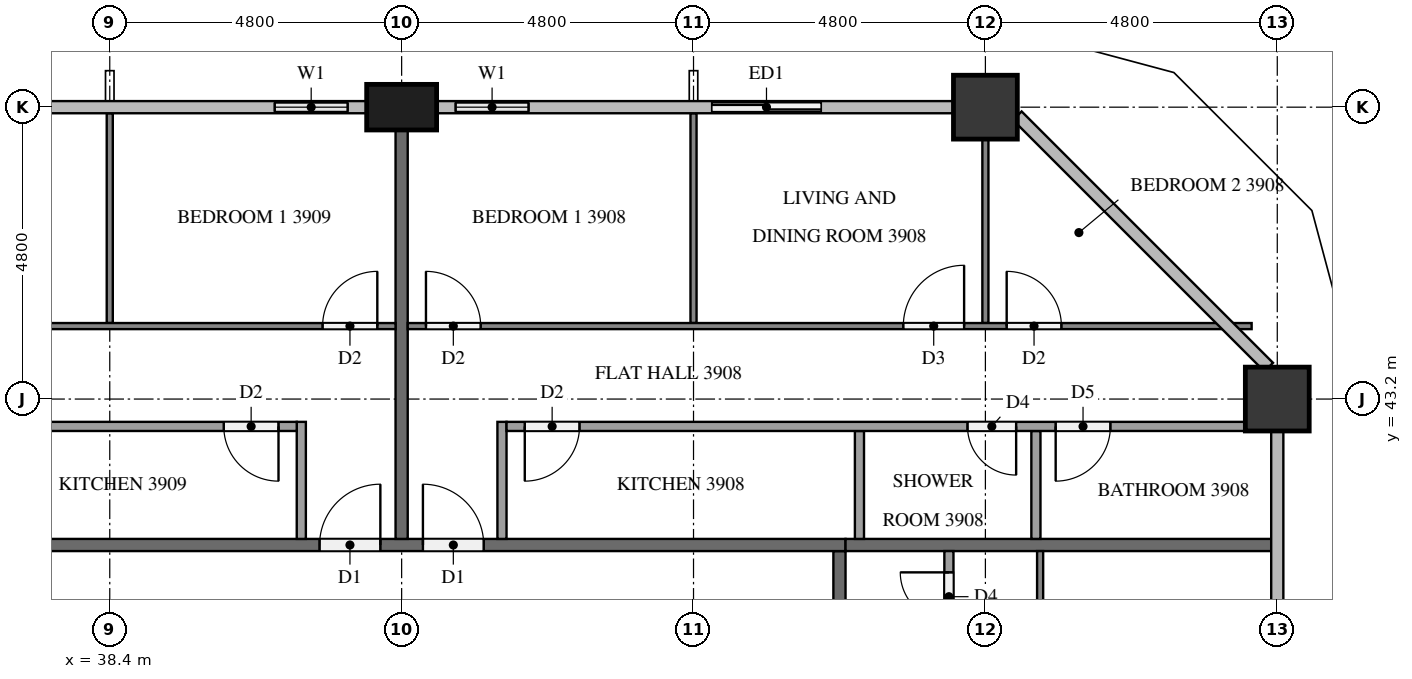
"""IFC4 building model, lengths in metres.
Left out: names, types, materials, properties, quantities, classifications, styles, units other than length and angle.
Written with IfcOpenShell. Run it as: python <this file> out.ifc"""

import sys

from ifc_helpers import new_model, si_unit, direction, frame, frame_2d, origin, origin_2d, place, context, subcontext, project, spatial, rectangle, extrude, element, fill, save


model = new_model("IFC4")
c1 = context("Model", 3, precision=1e-05, world=origin(), true_north=direction((0.0, 1.0)))
c2 = subcontext(c1, "Body", "Model", "MODEL_VIEW")
j1 = project(units=[si_unit("LENGTHUNIT", "METRE"), si_unit("PLANEANGLEUNIT", "RADIAN")], contexts=[c1])
p1 = place(None, origin())
s1 = spatial("IfcSite", under=j1, at=p1, CompositionType="ELEMENT")
p2 = place(p1, origin())
s2 = spatial("IfcBuilding", under=s1, at=p2, CompositionType="ELEMENT")
p3 = place(p2, frame((0.0, 0.0, 152.5)))
s3 = spatial("IfcBuildingStorey", under=s2, at=p3, CompositionType="ELEMENT", Elevation=152.5)
for number, where, z_axis, x_axis in (
    (1, (57.6, 43.2, 0.0), (0.0, 0.0, 1.0), (1.0, 0.0, 0.0)),
    (2, (52.8, 48.0, 0.0), (0.0, 0.0, 1.0), (1.0, 0.0, 0.0)),
):
    element("IfcColumn", number, at=place(p3, frame(where, z_axis=z_axis, x_axis=x_axis)), inside=s3, PredefinedType="COLUMN", context=c2, shape_type="SweptSolid", body=[
        extrude(rectangle(XDim=1.05, YDim=1.05, at=origin_2d()), origin(), (0.0, 0.0, 1.0), 3.2),
    ])
p4 = place(p3, frame((43.2, 48.0, 0.0), z_axis=(0.0, 0.0, 1.0), x_axis=(1.0, 0.0, 0.0)))
e3 = element("IfcColumn", 3, at=p4, inside=s3, PredefinedType="COLUMN", context=c2, shape_type="SweptSolid", body=[
    extrude(rectangle(XDim=1.15, YDim=0.75, at=origin_2d()), origin(), (0.0, 0.0, 1.0), 3.2),
])
p5 = place(p3, frame((50.4, 48.0, 0.0), z_axis=(0.0, 0.0, 1.0), x_axis=(-1.0, 0.0, 0.0)))
e4 = element("IfcWall", 4, at=p5, inside=s3, PredefinedType="SOLIDWALL", context=c2, shape_type="SweptSolid", body=[
    extrude(rectangle(XDim=2.4, YDim=0.15, at=frame_2d((1.2, 0.0))), origin(), (0.0, 0.0, 1.0), 3.2),
])
p6 = place(p5, frame((0.3, 0.0, 0.0)))
e5 = element("IfcOpeningElement", 5, at=p6, cuts=e4, PredefinedType="OPENING", context=c2, shape_type="SweptSolid", body=[
    extrude(rectangle(XDim=1.8, YDim=2.4, at=frame_2d((0.9, 1.2))), frame((0.0, 0.085, 0.0), z_axis=(0.0, -1.0, 0.0), x_axis=(1.0, 0.0, 0.0)), (0.0, 0.0, 1.0), 0.17),
])
p7 = place(p3, frame((45.6, 48.0, 0.0), z_axis=(0.0, 0.0, 1.0), x_axis=(-1.0, 0.0, 0.0)))
e6 = element("IfcWall", 6, at=p7, inside=s3, PredefinedType="SOLIDWALL", context=c2, shape_type="SweptSolid", body=[
    extrude(rectangle(XDim=1.825, YDim=0.15, at=frame_2d((0.913, 0.0))), origin(), (0.0, 0.0, 1.0), 3.2),
])
p8 = place(p7, frame((0.312, 0.0, 0.9)))
e7 = element("IfcOpeningElement", 7, at=p8, cuts=e6, PredefinedType="OPENING", context=c2, shape_type="SweptSolid", body=[
    extrude(rectangle(XDim=1.2, YDim=1.4, at=frame_2d((0.6, 0.7))), frame((0.0, 0.085, 0.0), z_axis=(0.0, -1.0, 0.0), x_axis=(1.0, 0.0, 0.0)), (0.0, 0.0, 1.0), 0.17),
])
p9 = place(p3, frame((42.625, 48.0, 0.0), z_axis=(0.0, 0.0, 1.0), x_axis=(-1.0, 0.0, 0.0)))
e8 = element("IfcWall", 8, at=p9, inside=s3, PredefinedType="SOLIDWALL", context=c2, shape_type="SweptSolid", body=[
    extrude(rectangle(XDim=1.825, YDim=0.15, at=frame_2d((0.913, 0.0))), origin(), (0.0, 0.0, 1.0), 3.2),
])
p10 = place(p9, frame((0.312, 0.0, 0.9)))
e9 = element("IfcOpeningElement", 9, at=p10, cuts=e8, PredefinedType="OPENING", context=c2, shape_type="SweptSolid", body=[
    extrude(rectangle(XDim=1.2, YDim=1.4, at=frame_2d((0.6, 0.7))), frame((0.0, 0.085, 0.0), z_axis=(0.0, -1.0, 0.0), x_axis=(1.0, 0.0, 0.0)), (0.0, 0.0, 1.0), 0.17),
])
p11 = place(p3, frame((50.4, 40.7, 0.0), z_axis=(0.0, 0.0, 1.0), x_axis=(0.0, -1.0, 0.0)))
e10 = element("IfcWall", 10, at=p11, inside=s3, PredefinedType="PARTITIONING", context=c2, shape_type="SweptSolid", body=[
    extrude(rectangle(XDim=28.6, YDim=0.2, at=frame_2d((14.3, 0.0))), origin(), (0.0, 0.0, 1.0), 3.2),
])
p12 = place(p11, frame((17.05, 0.0, 0.0)))
e11 = element("IfcOpeningElement", 11, at=p12, cuts=e10, PredefinedType="OPENING", context=c2, shape_type="SweptSolid", body=[
    extrude(rectangle(XDim=1.0, YDim=2.1, at=frame_2d((0.5, 1.05))), frame((0.0, 0.11, 0.0), z_axis=(0.0, -1.0, 0.0), x_axis=(1.0, 0.0, 0.0)), (0.0, 0.0, 1.0), 0.22),
])
p13 = place(p11, frame((15.35, 0.0, 0.0)))
e12 = element("IfcOpeningElement", 12, at=p13, cuts=e10, PredefinedType="OPENING", context=c2, shape_type="SweptSolid", body=[
    extrude(rectangle(XDim=1.0, YDim=2.1, at=frame_2d((0.5, 1.05))), frame((0.0, 0.11, 0.0), z_axis=(0.0, -1.0, 0.0), x_axis=(1.0, 0.0, 0.0)), (0.0, 0.0, 1.0), 0.22),
])
p14 = place(p11, frame((5.75, 0.0, 0.0)))
e13 = element("IfcOpeningElement", 13, at=p14, cuts=e10, PredefinedType="OPENING", context=c2, shape_type="SweptSolid", body=[
    extrude(rectangle(XDim=1.0, YDim=2.1, at=frame_2d((0.5, 1.05))), frame((0.0, 0.11, 0.0), z_axis=(0.0, -1.0, 0.0), x_axis=(1.0, 0.0, 0.0)), (0.0, 0.0, 1.0), 0.22),
])
p15 = place(p3, frame((11.9, 40.8, 0.0), z_axis=(0.0, 0.0, 1.0), x_axis=(1.0, 0.0, 0.0)))
e14 = element("IfcWall", 14, at=p15, inside=s3, PredefinedType="PARTITIONING", context=c2, shape_type="SweptSolid", body=[
    extrude(rectangle(XDim=38.6, YDim=0.2, at=frame_2d((19.3, 0.0))), origin(), (0.0, 0.0, 1.0), 3.2),
])
p16 = place(p15, frame((31.65, 0.0, 0.0)))
e15 = element("IfcOpeningElement", 15, at=p16, cuts=e14, PredefinedType="OPENING", context=c2, shape_type="SweptSolid", body=[
    extrude(rectangle(XDim=1.0, YDim=2.1, at=frame_2d((0.5, 1.05))), frame((0.0, 0.11, 0.0), z_axis=(0.0, -1.0, 0.0), x_axis=(1.0, 0.0, 0.0)), (0.0, 0.0, 1.0), 0.22),
])
p17 = place(p15, frame((29.95, 0.0, 0.0)))
e16 = element("IfcOpeningElement", 16, at=p17, cuts=e14, PredefinedType="OPENING", context=c2, shape_type="SweptSolid", body=[
    extrude(rectangle(XDim=1.0, YDim=2.1, at=frame_2d((0.5, 1.05))), frame((0.0, 0.11, 0.0), z_axis=(0.0, -1.0, 0.0), x_axis=(1.0, 0.0, 0.0)), (0.0, 0.0, 1.0), 0.22),
])
p18 = place(p15, frame((15.55, 0.0, 0.0)))
e17 = element("IfcOpeningElement", 17, at=p18, cuts=e14, PredefinedType="OPENING", context=c2, shape_type="SweptSolid", body=[
    extrude(rectangle(XDim=1.0, YDim=2.1, at=frame_2d((0.5, 1.05))), frame((0.0, 0.11, 0.0), z_axis=(0.0, -1.0, 0.0), x_axis=(1.0, 0.0, 0.0)), (0.0, 0.0, 1.0), 0.22),
])
p19 = place(p15, frame((1.15, 0.0, 0.0)))
e18 = element("IfcOpeningElement", 18, at=p19, cuts=e14, PredefinedType="OPENING", context=c2, shape_type="SweptSolid", body=[
    extrude(rectangle(XDim=1.0, YDim=2.1, at=frame_2d((0.5, 1.05))), frame((0.0, 0.11, 0.0), z_axis=(0.0, -1.0, 0.0), x_axis=(1.0, 0.0, 0.0)), (0.0, 0.0, 1.0), 0.22),
])
p20 = place(p3, frame((50.5, 40.8, 0.0), z_axis=(0.0, 0.0, 1.0), x_axis=(1.0, 0.0, 0.0)))
e19 = element("IfcWall", 19, at=p20, inside=s3, PredefinedType="PARTITIONING", context=c2, shape_type="SweptSolid", body=[
    extrude(rectangle(XDim=7.0, YDim=0.2, at=frame_2d((3.5, 0.0))), origin(), (0.0, 0.0, 1.0), 3.2),
])
p21 = place(p3, frame((43.2, 47.625, 0.0), z_axis=(0.0, 0.0, 1.0), x_axis=(0.0, -1.0, 0.0)))
e20 = element("IfcWall", 20, at=p21, inside=s3, PredefinedType="PARTITIONING", context=c2, shape_type="SweptSolid", body=[
    extrude(rectangle(XDim=6.725, YDim=0.2, at=frame_2d((3.363, 0.0))), origin(), (0.0, 0.0, 1.0), 3.2),
])
p22 = place(p3, frame((53.7, 40.7, 0.0), z_axis=(0.0, 0.0, 1.0), x_axis=(0.0, -1.0, 0.0)))
e21 = element("IfcWall", 21, at=p22, inside=s3, PredefinedType="PARTITIONING", context=c2, shape_type="SweptSolid", body=[
    extrude(rectangle(XDim=7.0, YDim=0.1, at=frame_2d((3.5, 0.0))), origin(), (0.0, 0.0, 1.0), 3.2),
])
p23 = place(p22, frame((5.7, 0.0, 0.0)))
e22 = element("IfcOpeningElement", 22, at=p23, cuts=e21, PredefinedType="OPENING", context=c2, shape_type="SweptSolid", body=[
    extrude(rectangle(XDim=1.0, YDim=2.1, at=frame_2d((0.5, 1.05))), frame((0.0, 0.06, 0.0), z_axis=(0.0, -1.0, 0.0), x_axis=(1.0, 0.0, 0.0)), (0.0, 0.0, 1.0), 0.12),
])
p24 = place(p3, frame((52.2, 35.325, 0.0), z_axis=(0.0, 0.0, 1.0), x_axis=(0.0, 1.0, 0.0)))
e23 = element("IfcWall", 23, at=p24, inside=s3, PredefinedType="PARTITIONING", context=c2, shape_type="SweptSolid", body=[
    extrude(rectangle(XDim=5.375, YDim=0.15, at=frame_2d((2.688, 0.0))), origin(), (0.0, 0.0, 1.0), 3.2),
])
p25 = place(p24, frame((0.3, 0.0, 0.0)))
e24 = element("IfcOpeningElement", 24, at=p25, cuts=e23, PredefinedType="OPENING", context=c2, shape_type="SweptSolid", body=[
    extrude(rectangle(XDim=0.9, YDim=2.1, at=frame_2d((0.45, 1.05))), frame((0.0, 0.085, 0.0), z_axis=(0.0, -1.0, 0.0), x_axis=(1.0, 0.0, 0.0)), (0.0, 0.0, 1.0), 0.17),
])
p26 = place(p24, frame((4.225, 0.0, 0.0)))
e25 = element("IfcOpeningElement", 25, at=p26, cuts=e23, PredefinedType="OPENING", context=c2, shape_type="SweptSolid", body=[
    extrude(rectangle(XDim=0.8, YDim=2.1, at=frame_2d((0.4, 1.05))), frame((0.0, 0.085, 0.0), z_axis=(0.0, -1.0, 0.0), x_axis=(1.0, 0.0, 0.0)), (0.0, 0.0, 1.0), 0.17),
])
p27 = place(p3, frame((48.0, 44.45, 0.0), z_axis=(0.0, 0.0, 1.0), x_axis=(0.0, 1.0, 0.0)))
e26 = element("IfcWall", 26, at=p27, inside=s3, PredefinedType="PARTITIONING", context=c2, shape_type="SweptSolid", body=[
    extrude(rectangle(XDim=3.45, YDim=0.1, at=frame_2d((1.725, 0.0))), origin(), (0.0, 0.0, 1.0), 3.2),
])
p28 = place(p3, frame((52.8, 44.45, 0.0), z_axis=(0.0, 0.0, 1.0), x_axis=(0.0, 1.0, 0.0)))
e27 = element("IfcWall", 27, at=p28, inside=s3, PredefinedType="PARTITIONING", context=c2, shape_type="SweptSolid", body=[
    extrude(rectangle(XDim=3.025, YDim=0.1, at=frame_2d((1.513, 0.0))), origin(), (0.0, 0.0, 1.0), 3.2),
])
p29 = place(p3, frame((43.3, 44.4, 0.0), z_axis=(0.0, 0.0, 1.0), x_axis=(1.0, 0.0, 0.0)))
e28 = element("IfcWall", 28, at=p29, inside=s3, PredefinedType="PARTITIONING", context=c2, shape_type="SweptSolid", body=[
    extrude(rectangle(XDim=13.878, YDim=0.1, at=frame_2d((6.939, 0.0))), origin(), (0.0, 0.0, 1.0), 3.2),
])
p30 = place(p29, frame((0.3, 0.0, 0.0)))
e29 = element("IfcOpeningElement", 29, at=p30, cuts=e28, PredefinedType="OPENING", context=c2, shape_type="SweptSolid", body=[
    extrude(rectangle(XDim=0.9, YDim=2.1, at=frame_2d((0.45, 1.05))), frame((0.0, 0.06, 0.0), z_axis=(0.0, -1.0, 0.0), x_axis=(1.0, 0.0, 0.0)), (0.0, 0.0, 1.0), 0.12),
])
p31 = place(p29, frame((8.15, 0.0, 0.0)))
e30 = element("IfcOpeningElement", 30, at=p31, cuts=e28, PredefinedType="OPENING", context=c2, shape_type="SweptSolid", body=[
    extrude(rectangle(XDim=1.0, YDim=2.1, at=frame_2d((0.5, 1.05))), frame((0.0, 0.06, 0.0), z_axis=(0.0, -1.0, 0.0), x_axis=(1.0, 0.0, 0.0)), (0.0, 0.0, 1.0), 0.12),
])
p32 = place(p29, frame((9.85, 0.0, 0.0)))
e31 = element("IfcOpeningElement", 31, at=p32, cuts=e28, PredefinedType="OPENING", context=c2, shape_type="SweptSolid", body=[
    extrude(rectangle(XDim=0.9, YDim=2.1, at=frame_2d((0.45, 1.05))), frame((0.0, 0.06, 0.0), z_axis=(0.0, -1.0, 0.0), x_axis=(1.0, 0.0, 0.0)), (0.0, 0.0, 1.0), 0.12),
])
for number, where, z_axis, x_axis in (
    (32, (50.729, 40.9, 0.0), (0.0, 0.0, 1.0), (0.0, 1.0, 0.0)),
    (33, (53.631, 40.9, 0.0), (0.0, 0.0, 1.0), (0.0, 1.0, 0.0)),
):
    element("IfcWall", number, at=place(p3, frame(where, z_axis=z_axis, x_axis=x_axis)), inside=s3, PredefinedType="PARTITIONING", context=c2, shape_type="SweptSolid", body=[
        extrude(rectangle(XDim=1.775, YDim=0.15, at=frame_2d((0.888, 0.0))), origin(), (0.0, 0.0, 1.0), 3.2),
    ])
p33 = place(p3, frame((44.85, 40.9, 0.0), z_axis=(0.0, 0.0, 1.0), x_axis=(0.0, 1.0, 0.0)))
e34 = element("IfcWall", 34, at=p33, inside=s3, PredefinedType="PARTITIONING", context=c2, shape_type="SweptSolid", body=[
    extrude(rectangle(XDim=1.925, YDim=0.15, at=frame_2d((0.962, 0.0))), origin(), (0.0, 0.0, 1.0), 3.2),
])
p34 = place(p3, frame((57.075, 42.75, 0.0), z_axis=(0.0, 0.0, 1.0), x_axis=(-1.0, 0.0, 0.0)))
e35 = element("IfcWall", 35, at=p34, inside=s3, PredefinedType="PARTITIONING", context=c2, shape_type="SweptSolid", body=[
    extrude(rectangle(XDim=12.15, YDim=0.15, at=frame_2d((6.075, 0.0))), origin(), (0.0, 0.0, 1.0), 3.2),
])
p35 = place(p34, frame((10.95, 0.0, 0.0)))
e36 = element("IfcOpeningElement", 36, at=p35, cuts=e35, PredefinedType="OPENING", context=c2, shape_type="SweptSolid", body=[
    extrude(rectangle(XDim=0.9, YDim=2.1, at=frame_2d((0.45, 1.05))), frame((0.0, 0.085, 0.0), z_axis=(0.0, -1.0, 0.0), x_axis=(1.0, 0.0, 0.0)), (0.0, 0.0, 1.0), 0.17),
])
p36 = place(p34, frame((3.769, 0.0, 0.0)))
e37 = element("IfcOpeningElement", 37, at=p36, cuts=e35, PredefinedType="OPENING", context=c2, shape_type="SweptSolid", body=[
    extrude(rectangle(XDim=0.8, YDim=2.1, at=frame_2d((0.4, 1.05))), frame((0.0, 0.085, 0.0), z_axis=(0.0, -1.0, 0.0), x_axis=(1.0, 0.0, 0.0)), (0.0, 0.0, 1.0), 0.17),
])
p37 = place(p34, frame((2.219, 0.0, 0.0)))
e38 = element("IfcOpeningElement", 38, at=p37, cuts=e35, PredefinedType="OPENING", context=c2, shape_type="SweptSolid", body=[
    extrude(rectangle(XDim=0.9, YDim=2.1, at=frame_2d((0.45, 1.05))), frame((0.0, 0.085, 0.0), z_axis=(0.0, -1.0, 0.0), x_axis=(1.0, 0.0, 0.0)), (0.0, 0.0, 1.0), 0.17),
])
p38 = place(p3, frame((38.4, 44.45, 0.0), z_axis=(0.0, 0.0, 1.0), x_axis=(0.0, 1.0, 0.0)))
e39 = element("IfcWall", 39, at=p38, inside=s3, PredefinedType="PARTITIONING", context=c2, shape_type="SweptSolid", body=[
    extrude(rectangle(XDim=3.45, YDim=0.1, at=frame_2d((1.725, 0.0))), origin(), (0.0, 0.0, 1.0), 3.2),
])
p39 = place(p3, frame((28.9, 44.4, 0.0), z_axis=(0.0, 0.0, 1.0), x_axis=(1.0, 0.0, 0.0)))
e40 = element("IfcWall", 40, at=p39, inside=s3, PredefinedType="PARTITIONING", context=c2, shape_type="SweptSolid", body=[
    extrude(rectangle(XDim=14.2, YDim=0.1, at=frame_2d((7.1, 0.0))), origin(), (0.0, 0.0, 1.0), 3.2),
])
p40 = place(p39, frame((13.0, 0.0, 0.0)))
e41 = element("IfcOpeningElement", 41, at=p40, cuts=e40, PredefinedType="OPENING", context=c2, shape_type="SweptSolid", body=[
    extrude(rectangle(XDim=0.9, YDim=2.1, at=frame_2d((0.45, 1.05))), frame((0.0, 0.06, 0.0), z_axis=(0.0, -1.0, 0.0), x_axis=(1.0, 0.0, 0.0)), (0.0, 0.0, 1.0), 0.12),
])
p41 = place(p39, frame((5.05, 0.0, 0.0)))
e42 = element("IfcOpeningElement", 42, at=p41, cuts=e40, PredefinedType="OPENING", context=c2, shape_type="SweptSolid", body=[
    extrude(rectangle(XDim=0.9, YDim=2.1, at=frame_2d((0.45, 1.05))), frame((0.0, 0.06, 0.0), z_axis=(0.0, -1.0, 0.0), x_axis=(1.0, 0.0, 0.0)), (0.0, 0.0, 1.0), 0.12),
])
p42 = place(p39, frame((3.35, 0.0, 0.0)))
e43 = element("IfcOpeningElement", 43, at=p42, cuts=e40, PredefinedType="OPENING", context=c2, shape_type="SweptSolid", body=[
    extrude(rectangle(XDim=1.0, YDim=2.1, at=frame_2d((0.5, 1.05))), frame((0.0, 0.06, 0.0), z_axis=(0.0, -1.0, 0.0), x_axis=(1.0, 0.0, 0.0)), (0.0, 0.0, 1.0), 0.12),
])
p43 = place(p3, frame((41.55, 40.9, 0.0), z_axis=(0.0, 0.0, 1.0), x_axis=(0.0, 1.0, 0.0)))
e44 = element("IfcWall", 44, at=p43, inside=s3, PredefinedType="PARTITIONING", context=c2, shape_type="SweptSolid", body=[
    extrude(rectangle(XDim=1.925, YDim=0.15, at=frame_2d((0.962, 0.0))), origin(), (0.0, 0.0, 1.0), 3.2),
])
p44 = place(p3, frame((41.475, 42.75, 0.0), z_axis=(0.0, 0.0, 1.0), x_axis=(-1.0, 0.0, 0.0)))
e45 = element("IfcWall", 45, at=p44, inside=s3, PredefinedType="PARTITIONING", context=c2, shape_type="SweptSolid", body=[
    extrude(rectangle(XDim=12.575, YDim=0.15, at=frame_2d((6.288, 0.0))), origin(), (0.0, 0.0, 1.0), 3.2),
])
p45 = place(p44, frame((0.3, 0.0, 0.0)))
e46 = element("IfcOpeningElement", 46, at=p45, cuts=e45, PredefinedType="OPENING", context=c2, shape_type="SweptSolid", body=[
    extrude(rectangle(XDim=0.9, YDim=2.1, at=frame_2d((0.45, 1.05))), frame((0.0, 0.085, 0.0), z_axis=(0.0, -1.0, 0.0), x_axis=(1.0, 0.0, 0.0)), (0.0, 0.0, 1.0), 0.17),
])
p46 = place(p44, frame((7.581, 0.0, 0.0)))
e47 = element("IfcOpeningElement", 47, at=p46, cuts=e45, PredefinedType="OPENING", context=c2, shape_type="SweptSolid", body=[
    extrude(rectangle(XDim=0.8, YDim=2.1, at=frame_2d((0.4, 1.05))), frame((0.0, 0.085, 0.0), z_axis=(0.0, -1.0, 0.0), x_axis=(1.0, 0.0, 0.0)), (0.0, 0.0, 1.0), 0.17),
])
p47 = place(p44, frame((9.031, 0.0, 0.0)))
e48 = element("IfcOpeningElement", 48, at=p47, cuts=e45, PredefinedType="OPENING", context=c2, shape_type="SweptSolid", body=[
    extrude(rectangle(XDim=0.9, YDim=2.1, at=frame_2d((0.45, 1.05))), frame((0.0, 0.085, 0.0), z_axis=(0.0, -1.0, 0.0), x_axis=(1.0, 0.0, 0.0)), (0.0, 0.0, 1.0), 0.17),
])
p48 = place(p6, origin())
e49 = element("IfcDoor", 49, at=p48, inside=s3, OperationType="SLIDING_TO_RIGHT", PredefinedType="DOOR", context=c2, shape_type="SweptSolid", body=[
    extrude(rectangle(XDim=1.8, YDim=2.4, at=frame_2d((0.9, 1.2))), frame((0.0, 0.025, 0.0), z_axis=(0.0, -1.0, 0.0), x_axis=(1.0, 0.0, 0.0)), (0.0, 0.0, 1.0), 0.05),
])
fill(e5, e49)
p49 = place(p8, origin())
e50 = element("IfcWindow", 50, at=p49, inside=s3, PartitioningType="SINGLE_PANEL", PredefinedType="WINDOW", context=c2, shape_type="SweptSolid", body=[
    extrude(rectangle(XDim=1.2, YDim=1.4, at=frame_2d((0.6, 0.7))), frame((0.0, 0.03, 0.0), z_axis=(0.0, -1.0, 0.0), x_axis=(1.0, 0.0, 0.0)), (0.0, 0.0, 1.0), 0.06),
])
fill(e7, e50)
p50 = place(p10, origin())
e51 = element("IfcWindow", 51, at=p50, inside=s3, PartitioningType="SINGLE_PANEL", PredefinedType="WINDOW", context=c2, shape_type="SweptSolid", body=[
    extrude(rectangle(XDim=1.2, YDim=1.4, at=frame_2d((0.6, 0.7))), frame((0.0, 0.03, 0.0), z_axis=(0.0, -1.0, 0.0), x_axis=(1.0, 0.0, 0.0)), (0.0, 0.0, 1.0), 0.06),
])
fill(e9, e51)
p51 = place(p16, origin())
e52 = element("IfcDoor", 52, at=p51, inside=s3, OperationType="SINGLE_SWING_LEFT", PredefinedType="DOOR", context=c2, shape_type="SweptSolid", body=[
    extrude(rectangle(XDim=1.0, YDim=2.1, at=frame_2d((0.5, 1.05))), frame((0.0, 0.025, 0.0), z_axis=(0.0, -1.0, 0.0), x_axis=(1.0, 0.0, 0.0)), (0.0, 0.0, 1.0), 0.05),
])
fill(e15, e52)
p52 = place(p17, origin())
e53 = element("IfcDoor", 53, at=p52, inside=s3, OperationType="SINGLE_SWING_RIGHT", PredefinedType="DOOR", context=c2, shape_type="SweptSolid", body=[
    extrude(rectangle(XDim=1.0, YDim=2.1, at=frame_2d((0.5, 1.05))), frame((0.0, 0.025, 0.0), z_axis=(0.0, -1.0, 0.0), x_axis=(1.0, 0.0, 0.0)), (0.0, 0.0, 1.0), 0.05),
])
fill(e16, e53)
p53 = place(p26, origin())
e54 = element("IfcDoor", 54, at=p53, inside=s3, OperationType="SINGLE_SWING_RIGHT", PredefinedType="DOOR", context=c2, shape_type="SweptSolid", body=[
    extrude(rectangle(XDim=0.8, YDim=2.1, at=frame_2d((0.4, 1.05))), frame((0.0, 0.025, 0.0), z_axis=(0.0, -1.0, 0.0), x_axis=(1.0, 0.0, 0.0)), (0.0, 0.0, 1.0), 0.05),
])
fill(e25, e54)
p54 = place(p30, origin())
e55 = element("IfcDoor", 55, at=p54, inside=s3, OperationType="SINGLE_SWING_LEFT", PredefinedType="DOOR", context=c2, shape_type="SweptSolid", body=[
    extrude(rectangle(XDim=0.9, YDim=2.1, at=frame_2d((0.45, 1.05))), frame((0.0, 0.025, 0.0), z_axis=(0.0, -1.0, 0.0), x_axis=(1.0, 0.0, 0.0)), (0.0, 0.0, 1.0), 0.05),
])
fill(e29, e55)
p55 = place(p31, origin())
e56 = element("IfcDoor", 56, at=p55, inside=s3, OperationType="SINGLE_SWING_RIGHT", PredefinedType="DOOR", context=c2, shape_type="SweptSolid", body=[
    extrude(rectangle(XDim=1.0, YDim=2.1, at=frame_2d((0.5, 1.05))), frame((0.0, 0.025, 0.0), z_axis=(0.0, -1.0, 0.0), x_axis=(1.0, 0.0, 0.0)), (0.0, 0.0, 1.0), 0.05),
])
fill(e30, e56)
p56 = place(p32, origin())
e57 = element("IfcDoor", 57, at=p56, inside=s3, OperationType="SINGLE_SWING_LEFT", PredefinedType="DOOR", context=c2, shape_type="SweptSolid", body=[
    extrude(rectangle(XDim=0.9, YDim=2.1, at=frame_2d((0.45, 1.05))), frame((0.0, 0.025, 0.0), z_axis=(0.0, -1.0, 0.0), x_axis=(1.0, 0.0, 0.0)), (0.0, 0.0, 1.0), 0.05),
])
fill(e31, e57)
p57 = place(p35, origin())
e58 = element("IfcDoor", 58, at=p57, inside=s3, OperationType="SINGLE_SWING_RIGHT", PredefinedType="DOOR", context=c2, shape_type="SweptSolid", body=[
    extrude(rectangle(XDim=0.9, YDim=2.1, at=frame_2d((0.45, 1.05))), frame((0.0, 0.025, 0.0), z_axis=(0.0, -1.0, 0.0), x_axis=(1.0, 0.0, 0.0)), (0.0, 0.0, 1.0), 0.05),
])
fill(e36, e58)
p58 = place(p36, origin())
e59 = element("IfcDoor", 59, at=p58, inside=s3, OperationType="SINGLE_SWING_LEFT", PredefinedType="DOOR", context=c2, shape_type="SweptSolid", body=[
    extrude(rectangle(XDim=0.8, YDim=2.1, at=frame_2d((0.4, 1.05))), frame((0.0, 0.025, 0.0), z_axis=(0.0, -1.0, 0.0), x_axis=(1.0, 0.0, 0.0)), (0.0, 0.0, 1.0), 0.05),
])
fill(e37, e59)
p59 = place(p37, origin())
e60 = element("IfcDoor", 60, at=p59, inside=s3, OperationType="SINGLE_SWING_RIGHT", PredefinedType="DOOR", context=c2, shape_type="SweptSolid", body=[
    extrude(rectangle(XDim=0.9, YDim=2.1, at=frame_2d((0.45, 1.05))), frame((0.0, 0.025, 0.0), z_axis=(0.0, -1.0, 0.0), x_axis=(1.0, 0.0, 0.0)), (0.0, 0.0, 1.0), 0.05),
])
fill(e38, e60)
p60 = place(p40, origin())
e61 = element("IfcDoor", 61, at=p60, inside=s3, OperationType="SINGLE_SWING_RIGHT", PredefinedType="DOOR", context=c2, shape_type="SweptSolid", body=[
    extrude(rectangle(XDim=0.9, YDim=2.1, at=frame_2d((0.45, 1.05))), frame((0.0, 0.025, 0.0), z_axis=(0.0, -1.0, 0.0), x_axis=(1.0, 0.0, 0.0)), (0.0, 0.0, 1.0), 0.05),
])
fill(e41, e61)
p61 = place(p45, origin())
e62 = element("IfcDoor", 62, at=p61, inside=s3, OperationType="SINGLE_SWING_LEFT", PredefinedType="DOOR", context=c2, shape_type="SweptSolid", body=[
    extrude(rectangle(XDim=0.9, YDim=2.1, at=frame_2d((0.45, 1.05))), frame((0.0, 0.025, 0.0), z_axis=(0.0, -1.0, 0.0), x_axis=(1.0, 0.0, 0.0)), (0.0, 0.0, 1.0), 0.05),
])
fill(e46, e62)
save(model, sys.argv[1])
